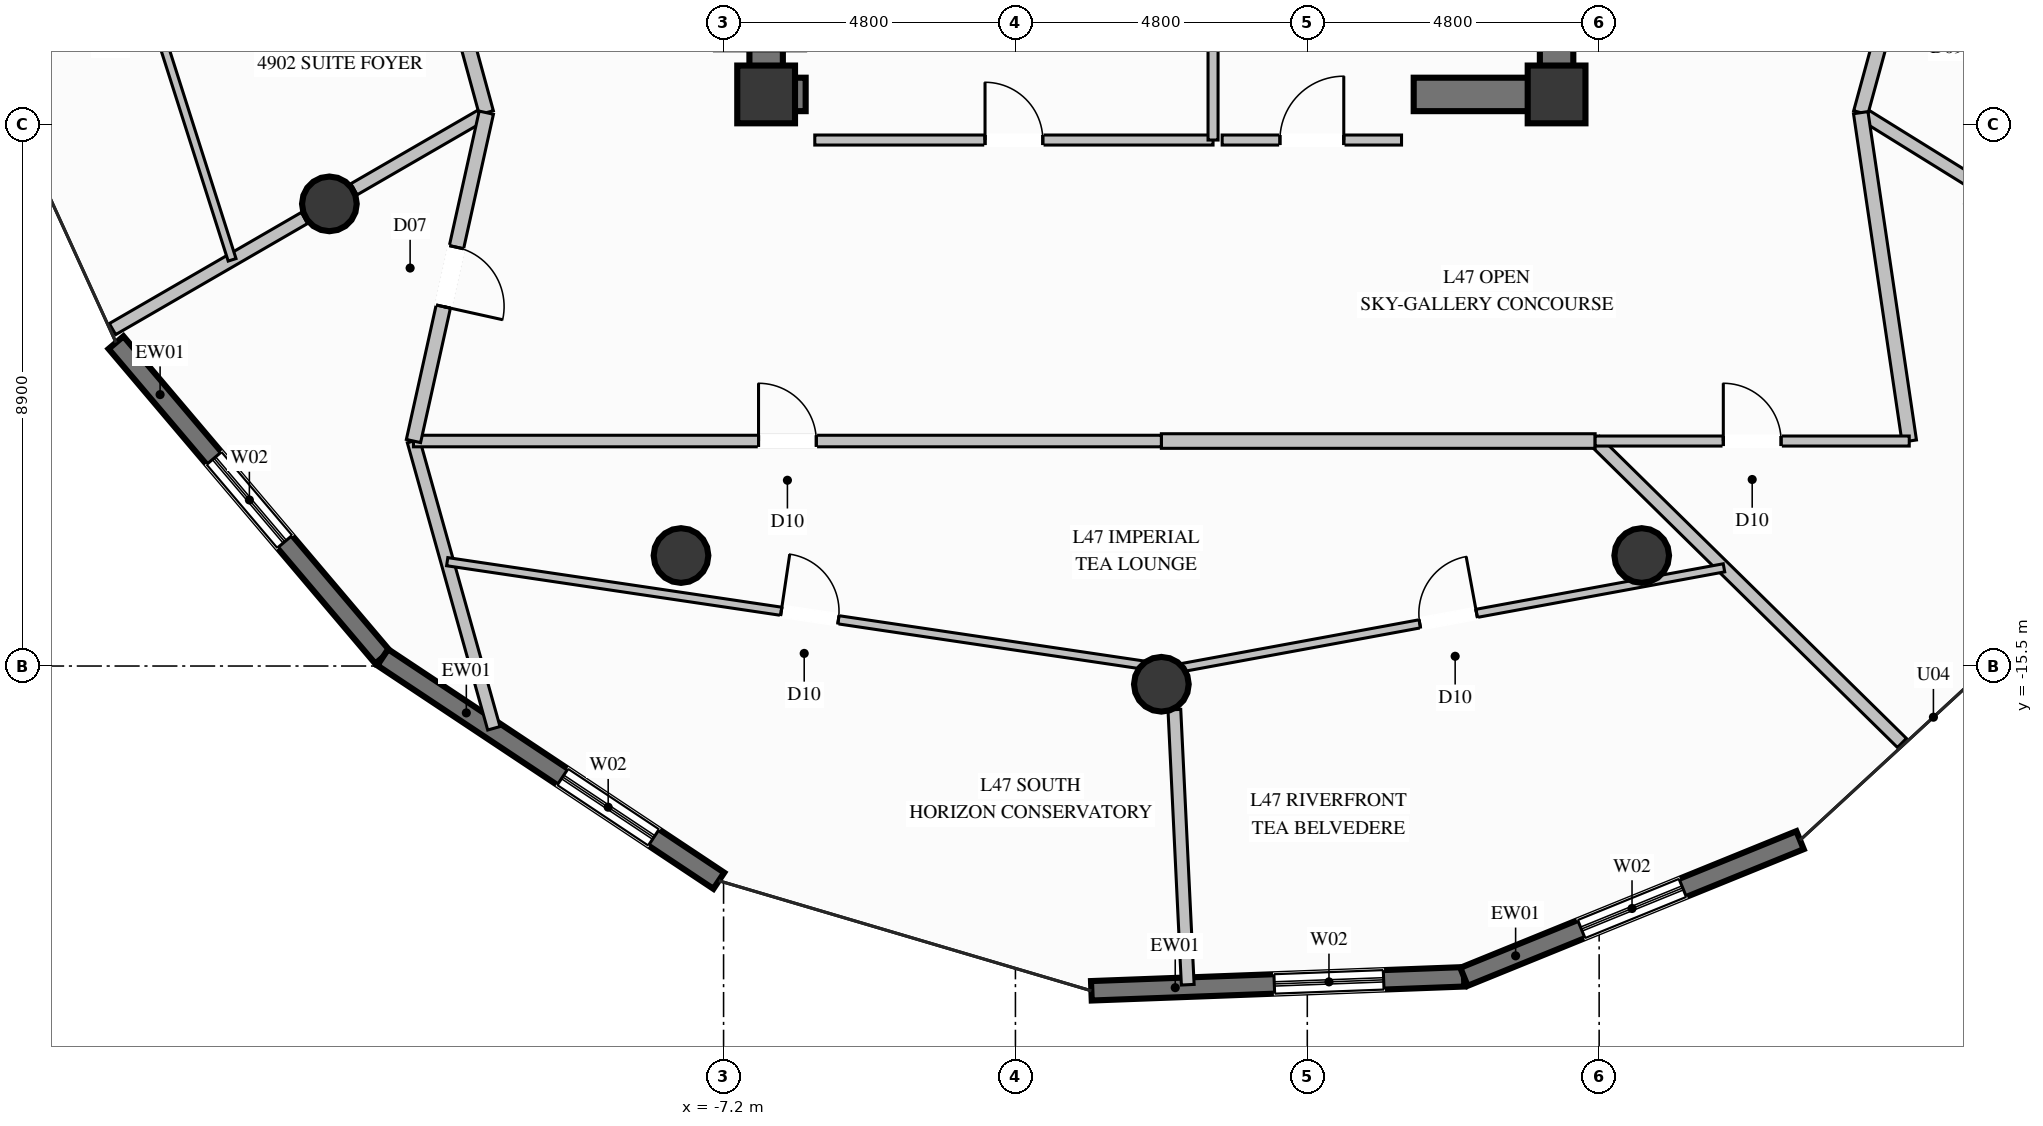
"""IFC4 building model, lengths in metres.
Left out: names, types, materials, properties, quantities, classifications, styles, units other than length and angle.
Written with IfcOpenShell. Run it as: python <this file> out.ifc"""

import sys

from ifc_helpers import new_model, si_unit, direction, frame, frame_2d, origin, origin_2d, place, context, subcontext, project, spatial, rectangle, circle, extrude, element, fill, save


model = new_model("IFC4")
c1 = context("Model", 3, precision=1e-05, world=origin(), true_north=direction((0.0, 1.0)))
c2 = subcontext(c1, "Body", "Model", "MODEL_VIEW")
j1 = project(units=[si_unit("LENGTHUNIT", "METRE"), si_unit("PLANEANGLEUNIT", "RADIAN")], contexts=[c1])
p1 = place(None, origin())
s1 = spatial("IfcSite", under=j1, at=p1, CompositionType="ELEMENT")
p2 = place(p1, origin())
s2 = spatial("IfcBuilding", under=s1, at=p2, CompositionType="ELEMENT")
p3 = place(p2, frame((0.0, 0.0, 184.0)))
s3 = spatial("IfcBuildingStorey", under=s2, at=p3, CompositionType="ELEMENT", Elevation=184.0)
for number, where, z_axis, x_axis in (
    (1, (-6.5, -6.1, 0.0), (0.0, 0.0, 1.0), (1.0, 0.0, 0.0)),
    (2, (6.5, -6.1, 0.0), (0.0, 0.0, 1.0), (1.0, 0.0, 0.0)),
):
    element("IfcColumn", number, at=place(p3, frame(where, z_axis=z_axis, x_axis=x_axis)), inside=s3, PredefinedType="COLUMN", context=c2, shape_type="SweptSolid", body=[
        extrude(rectangle(XDim=0.95, YDim=0.95, at=origin_2d()), origin(), (0.0, 0.0, 1.0), 3.6),
    ])
p4 = place(p3, frame((-6.225, -6.1, 0.0), z_axis=(0.0, 0.0, 1.0), x_axis=(1.0, 0.0, 0.0)))
e3 = element("IfcWall", 3, at=p4, inside=s3, PredefinedType="SHEAR", context=c2, shape_type="SweptSolid", body=[
    extrude(rectangle(XDim=0.375, YDim=0.55, at=frame_2d((0.188, 0.0))), origin(), (0.0, 0.0, 1.0), 3.6),
])
p5 = place(p3, frame((4.15, -6.1, 0.0), z_axis=(0.0, 0.0, 1.0), x_axis=(1.0, 0.0, 0.0)))
e4 = element("IfcWall", 4, at=p5, inside=s3, PredefinedType="SHEAR", context=c2, shape_type="SweptSolid", body=[
    extrude(rectangle(XDim=2.075, YDim=0.55, at=frame_2d((1.038, 0.0))), origin(), (0.0, 0.0, 1.0), 3.6),
])
p6 = place(p3, frame((-6.5, -6.375, 0.0), z_axis=(0.0, 0.0, 1.0), x_axis=(0.0, 1.0, 0.0)))
e5 = element("IfcWall", 5, at=p6, inside=s3, PredefinedType="SHEAR", context=c2, shape_type="SweptSolid", body=[
    extrude(rectangle(XDim=3.025, YDim=0.55, at=frame_2d((1.512, 0.0))), origin(), (0.0, 0.0, 1.0), 3.6),
])
p7 = place(p3, frame((6.5, -6.375, 0.0), z_axis=(0.0, 0.0, 1.0), x_axis=(0.0, 1.0, 0.0)))
e6 = element("IfcWall", 6, at=p7, inside=s3, PredefinedType="SHEAR", context=c2, shape_type="SweptSolid", body=[
    extrude(rectangle(XDim=4.025, YDim=0.55, at=frame_2d((2.012, 0.0))), origin(), (0.0, 0.0, 1.0), 3.6),
])
for number, where, z_axis, x_axis in (
    (7, (-13.683, -7.9, 0.0), (0.0, 0.0, 1.0), (1.0, 0.0, 0.0)),
    (8, (-7.9, -13.683, 0.0), (0.0, 0.0, 1.0), (1.0, 0.0, 0.0)),
    (9, (0.0, -15.8, 0.0), (0.0, 0.0, 1.0), (1.0, 0.0, 0.0)),
    (10, (7.9, -13.683, 0.0), (0.0, 0.0, 1.0), (1.0, 0.0, 0.0)),
):
    element("IfcColumn", number, at=place(p3, frame(where, z_axis=z_axis, x_axis=x_axis)), inside=s3, PredefinedType="COLUMN", context=c2, shape_type="SweptSolid", body=[
        extrude(circle(Radius=0.45, at=origin_2d()), origin(), (0.0, 0.0, 1.0), 3.6),
    ])
p8 = place(p3, frame((-12.806, -15.357, 0.0), z_axis=(0.0, 0.0, 1.0), x_axis=(-0.646480871515, 0.762930195212, 0.0)))
e11 = element("IfcWall", 11, at=p8, inside=s3, PredefinedType="SOLIDWALL", context=c2, shape_type="SweptSolid", body=[
    extrude(rectangle(XDim=6.784, YDim=0.32, at=frame_2d((3.392, 0.0))), origin(), (0.0, 0.0, 1.0), 3.36),
])
p9 = place(p8, frame((2.492, 0.0, 0.35)))
e12 = element("IfcOpeningElement", 12, at=p9, cuts=e11, PredefinedType="OPENING", context=c2, shape_type="SweptSolid", body=[
    extrude(rectangle(XDim=1.8, YDim=2.6, at=frame_2d((0.9, 1.3))), frame((0.0, 0.17, 0.0), z_axis=(0.0, -1.0, 0.0), x_axis=(1.0, 0.0, 0.0)), (0.0, 0.0, 1.0), 0.34),
])
p10 = place(p3, frame((-7.278, -19.031, 0.0), z_axis=(0.0, 0.0, 1.0), x_axis=(-0.832824739321, 0.553536768043, 0.0)))
e13 = element("IfcWall", 13, at=p10, inside=s3, PredefinedType="SOLIDWALL", context=c2, shape_type="SweptSolid", body=[
    extrude(rectangle(XDim=6.637, YDim=0.32, at=frame_2d((3.319, 0.0))), origin(), (0.0, 0.0, 1.0), 3.36),
])
p11 = place(p10, frame((1.285, 0.0, 0.35)))
e14 = element("IfcOpeningElement", 14, at=p11, cuts=e13, PredefinedType="OPENING", context=c2, shape_type="SweptSolid", body=[
    extrude(rectangle(XDim=1.8, YDim=2.6, at=frame_2d((0.9, 1.3))), frame((0.0, 0.17, 0.0), z_axis=(0.0, -1.0, 0.0), x_axis=(1.0, 0.0, 0.0)), (0.0, 0.0, 1.0), 0.34),
])
p12 = place(p3, frame((4.977, -20.611, 0.0), z_axis=(0.0, 0.0, 1.0), x_axis=(-0.999296497107, -0.037503478099, 0.0)))
e15 = element("IfcWall", 15, at=p12, inside=s3, PredefinedType="SOLIDWALL", context=c2, shape_type="SweptSolid", body=[
    extrude(rectangle(XDim=6.132, YDim=0.32, at=frame_2d((3.066, 0.0))), origin(), (0.0, 0.0, 1.0), 3.36),
])
p13 = place(p12, frame((1.322, 0.0, 0.35)))
e16 = element("IfcOpeningElement", 16, at=p13, cuts=e15, PredefinedType="OPENING", context=c2, shape_type="SweptSolid", body=[
    extrude(rectangle(XDim=1.8, YDim=2.6, at=frame_2d((0.9, 1.3))), frame((0.0, 0.17, 0.0), z_axis=(0.0, -1.0, 0.0), x_axis=(1.0, 0.0, 0.0)), (0.0, 0.0, 1.0), 0.34),
])
p14 = place(p3, frame((10.504, -18.364, 0.0), z_axis=(0.0, 0.0, 1.0), x_axis=(-0.926362198949, -0.376633875745, 0.0)))
e17 = element("IfcWall", 17, at=p14, inside=s3, PredefinedType="SOLIDWALL", context=c2, shape_type="SweptSolid", body=[
    extrude(rectangle(XDim=5.966, YDim=0.32, at=frame_2d((2.983, 0.0))), origin(), (0.0, 0.0, 1.0), 3.36),
])
p15 = place(p14, frame((2.083, 0.0, 0.35)))
e18 = element("IfcOpeningElement", 18, at=p15, cuts=e17, PredefinedType="OPENING", context=c2, shape_type="SweptSolid", body=[
    extrude(rectangle(XDim=1.8, YDim=2.6, at=frame_2d((0.9, 1.3))), frame((0.0, 0.17, 0.0), z_axis=(0.0, -1.0, 0.0), x_axis=(1.0, 0.0, 0.0)), (0.0, 0.0, 1.0), 0.34),
])
p16 = place(p3, frame((-5.7, -6.85, 0.0), z_axis=(0.0, 0.0, 1.0), x_axis=(1.0, 0.0, 0.0)))
e19 = element("IfcWall", 19, at=p16, inside=s3, PredefinedType="PARTITIONING", context=c2, shape_type="SweptSolid", body=[
    extrude(rectangle(XDim=6.55, YDim=0.165, at=frame_2d((3.275, 0.0))), origin(), (0.0, 0.0, 1.0), 2.445),
])
p17 = place(p16, frame((2.8, 0.0, 0.0)))
e20 = element("IfcOpeningElement", 20, at=p17, cuts=e19, PredefinedType="OPENING", context=c2, shape_type="SweptSolid", body=[
    extrude(rectangle(XDim=0.95, YDim=2.1, at=frame_2d((0.475, 1.05))), frame((0.0, 0.093, 0.0), z_axis=(0.0, -1.0, 0.0), x_axis=(1.0, 0.0, 0.0)), (0.0, 0.0, 1.0), 0.185),
])
p18 = place(p3, frame((0.85, -6.85, 0.0), z_axis=(0.0, 0.0, 1.0), x_axis=(0.0, 1.0, 0.0)))
e21 = element("IfcWall", 21, at=p18, inside=s3, PredefinedType="PARTITIONING", context=c2, shape_type="SweptSolid", body=[
    extrude(rectangle(XDim=3.35, YDim=0.165, at=frame_2d((1.675, 0.0))), origin(), (0.0, 0.0, 1.0), 3.36),
])
p19 = place(p3, frame((1.0, -6.85, 0.0), z_axis=(0.0, 0.0, 1.0), x_axis=(1.0, 0.0, 0.0)))
e22 = element("IfcWall", 22, at=p19, inside=s3, PredefinedType="PARTITIONING", context=c2, shape_type="SweptSolid", body=[
    extrude(rectangle(XDim=2.95, YDim=0.165, at=frame_2d((1.475, 0.0))), origin(), (0.0, 0.0, 1.0), 2.445),
])
p20 = place(p19, frame((0.95, 0.0, 0.0)))
e23 = element("IfcOpeningElement", 23, at=p20, cuts=e22, PredefinedType="OPENING", context=c2, shape_type="SweptSolid", body=[
    extrude(rectangle(XDim=1.05, YDim=2.15, at=frame_2d((0.525, 1.075))), frame((0.0, 0.093, 0.0), z_axis=(0.0, -1.0, 0.0), x_axis=(1.0, 0.0, 0.0)), (0.0, 0.0, 1.0), 0.185),
])
p21 = place(p3, frame((-11.102, -6.4, 0.0), z_axis=(0.0, 0.0, 1.0), x_axis=(-0.8654883009, -0.500929137708, 0.0)))
e24 = element("IfcWall", 24, at=p21, inside=s3, PredefinedType="PARTITIONING", context=c2, shape_type="SweptSolid", body=[
    extrude(rectangle(XDim=2.515, YDim=0.21, at=frame_2d((1.258, 0.0))), origin(), (0.0, 0.0, 1.0), 2.877),
])
p22 = place(p3, frame((-14.092, -8.131, 0.0), z_axis=(0.0, 0.0, 1.0), x_axis=(-0.865475144778, -0.50095186772, 0.0)))
e25 = element("IfcWall", 25, at=p22, inside=s3, PredefinedType="PARTITIONING", context=c2, shape_type="SweptSolid", body=[
    extrude(rectangle(XDim=3.649, YDim=0.21, at=frame_2d((1.824, 0.0))), origin(), (0.0, 0.0, 1.0), 3.36),
])
p23 = place(p3, frame((11.502, -6.4, 0.0), z_axis=(0.0, 0.0, 1.0), x_axis=(0.849789901528, -0.527121545054, 0.0)))
e26 = element("IfcWall", 26, at=p23, inside=s3, PredefinedType="PARTITIONING", context=c2, shape_type="SweptSolid", body=[
    extrude(rectangle(XDim=2.191, YDim=0.21, at=frame_2d((1.096, 0.0))), origin(), (0.0, 0.0, 1.0), 2.877),
])
p24 = place(p3, frame((-12.85, 0.0, 0.0), z_axis=(0.0, 0.0, 1.0), x_axis=(0.263484816116, -0.96466354325, 0.0)))
e27 = element("IfcWall", 27, at=p24, inside=s3, PredefinedType="PARTITIONING", context=c2, shape_type="SweptSolid", body=[
    extrude(rectangle(XDim=6.634, YDim=0.24, at=frame_2d((3.317, 0.0))), origin(), (0.0, 0.0, 1.0), 3.36),
])
p25 = place(p3, frame((-18.093, 0.0, 0.0), z_axis=(0.0, 0.0, 1.0), x_axis=(0.303563963888, -0.952811061979, 0.0)))
e28 = element("IfcWall", 28, at=p25, inside=s3, PredefinedType="PARTITIONING", context=c2, shape_type="SweptSolid", body=[
    extrude(rectangle(XDim=9.257, YDim=0.135, at=frame_2d((4.628, 0.0))), origin(), (0.0, 0.0, 1.0), 3.36),
])
p26 = place(p25, frame((4.153, 0.0, 0.0)))
e29 = element("IfcOpeningElement", 29, at=p26, cuts=e28, PredefinedType="OPENING", context=c2, shape_type="SweptSolid", body=[
    extrude(rectangle(XDim=0.95, YDim=2.1, at=frame_2d((0.475, 1.05))), frame((0.0, 0.078, 0.0), z_axis=(0.0, -1.0, 0.0), x_axis=(1.0, 0.0, 0.0)), (0.0, 0.0, 1.0), 0.155),
])
p27 = place(p3, frame((11.502, -6.4, 0.0), z_axis=(0.0, 0.0, 1.0), x_axis=(0.263465836707, 0.964668727019, 0.0)))
e30 = element("IfcWall", 30, at=p27, inside=s3, PredefinedType="PARTITIONING", context=c2, shape_type="SweptSolid", body=[
    extrude(rectangle(XDim=2.786, YDim=0.24, at=frame_2d((1.393, 0.0))), origin(), (0.0, 0.0, 1.0), 3.36),
])
p28 = place(p3, frame((7.134, -11.8, 0.0), z_axis=(0.0, 0.0, 1.0), x_axis=(0.712808698232, -0.701358510125, 0.0)))
e31 = element("IfcWall", 31, at=p28, inside=s3, PredefinedType="PARTITIONING", context=c2, shape_type="SweptSolid", body=[
    extrude(rectangle(XDim=7.079, YDim=0.21, at=frame_2d((3.54, 0.0))), origin(), (0.0, 0.0, 1.0), 3.36),
])
p29 = place(p3, frame((-12.3, -11.8, 0.0), z_axis=(0.0, 0.0, 1.0), x_axis=(0.269504390662, -0.962999160651, 0.0)))
e32 = element("IfcWall", 32, at=p29, inside=s3, PredefinedType="PARTITIONING", context=c2, shape_type="SweptSolid", body=[
    extrude(rectangle(XDim=4.905, YDim=0.21, at=frame_2d((2.453, 0.0))), origin(), (0.0, 0.0, 1.0), 3.36),
])
p30 = place(p3, frame((0.0, -11.8, 0.0), z_axis=(0.0, 0.0, 1.0), x_axis=(1.0, 0.0, 0.0)))
e33 = element("IfcWall", 33, at=p30, inside=s3, PredefinedType="PARTITIONING", context=c2, shape_type="SweptSolid", body=[
    extrude(rectangle(XDim=7.134, YDim=0.24, at=frame_2d((3.567, 0.0))), origin(), (0.0, 0.0, 1.0), 3.36),
])
p31 = place(p3, frame((-12.3, -11.8, 0.0), z_axis=(0.0, 0.0, 1.0), x_axis=(1.0, 0.0, 0.0)))
e34 = element("IfcWall", 34, at=p31, inside=s3, PredefinedType="PARTITIONING", context=c2, shape_type="SweptSolid", body=[
    extrude(rectangle(XDim=12.3, YDim=0.19, at=frame_2d((6.15, 0.0))), origin(), (0.0, 0.0, 1.0), 3.36),
])
p32 = place(p31, frame((5.675, 0.0, 0.0)))
e35 = element("IfcOpeningElement", 35, at=p32, cuts=e34, PredefinedType="OPENING", context=c2, shape_type="SweptSolid", body=[
    extrude(rectangle(XDim=0.95, YDim=2.1, at=frame_2d((0.475, 1.05))), frame((0.0, 0.105, 0.0), z_axis=(0.0, -1.0, 0.0), x_axis=(1.0, 0.0, 0.0)), (0.0, 0.0, 1.0), 0.21),
])
p33 = place(p3, frame((-11.102, -6.4, 0.0), z_axis=(0.0, 0.0, 1.0), x_axis=(-0.216579944639, -0.976264885971, 0.0)))
e36 = element("IfcWall", 36, at=p33, inside=s3, PredefinedType="PARTITIONING", context=c2, shape_type="SweptSolid", body=[
    extrude(rectangle(XDim=5.531, YDim=0.24, at=frame_2d((2.766, 0.0))), origin(), (0.0, 0.0, 1.0), 3.36),
])
p34 = place(p33, frame((2.266, 0.0, 0.0)))
e37 = element("IfcOpeningElement", 37, at=p34, cuts=e36, PredefinedType="OPENING", context=c2, shape_type="SweptSolid", body=[
    extrude(rectangle(XDim=1.0, YDim=2.2, at=frame_2d((0.5, 1.1))), frame((0.0, 0.13, 0.0), z_axis=(0.0, -1.0, 0.0), x_axis=(1.0, 0.0, 0.0)), (0.0, 0.0, 1.0), 0.26),
])
p35 = place(p3, frame((0.214, -16.218, 0.0), z_axis=(0.0, 0.0, 1.0), x_axis=(0.048576936136, -0.998819443781, 0.0)))
e38 = element("IfcWall", 38, at=p35, inside=s3, PredefinedType="PARTITIONING", context=c2, shape_type="SweptSolid", body=[
    extrude(rectangle(XDim=4.528, YDim=0.21, at=frame_2d((2.264, 0.0))), origin(), (0.0, 0.0, 1.0), 3.36),
])
p36 = place(p3, frame((-11.745, -13.784, 0.0), z_axis=(0.0, 0.0, 1.0), x_axis=(0.989154922739, -0.146875930026, 0.0)))
e39 = element("IfcWall", 39, at=p36, inside=s3, PredefinedType="PARTITIONING", context=c2, shape_type="SweptSolid", body=[
    extrude(rectangle(XDim=12.058, YDim=0.135, at=frame_2d((6.029, 0.0))), origin(), (0.0, 0.0, 1.0), 2.929),
])
p37 = place(p36, frame((5.554, 0.0, 0.0)))
e40 = element("IfcOpeningElement", 40, at=p37, cuts=e39, PredefinedType="OPENING", context=c2, shape_type="SweptSolid", body=[
    extrude(rectangle(XDim=0.95, YDim=2.1, at=frame_2d((0.475, 1.05))), frame((0.0, 0.078, 0.0), z_axis=(0.0, -1.0, 0.0), x_axis=(1.0, 0.0, 0.0)), (0.0, 0.0, 1.0), 0.155),
])
p38 = place(p3, frame((0.182, -15.555, 0.0), z_axis=(0.0, 0.0, 1.0), x_axis=(0.983473659369, 0.181051267126, 0.0)))
e41 = element("IfcWall", 41, at=p38, inside=s3, PredefinedType="PARTITIONING", context=c2, shape_type="SweptSolid", body=[
    extrude(rectangle(XDim=9.223, YDim=0.135, at=frame_2d((4.612, 0.0))), origin(), (0.0, 0.0, 1.0), 2.929),
])
p39 = place(p38, frame((4.137, 0.0, 0.0)))
e42 = element("IfcOpeningElement", 42, at=p39, cuts=e41, PredefinedType="OPENING", context=c2, shape_type="SweptSolid", body=[
    extrude(rectangle(XDim=0.95, YDim=2.1, at=frame_2d((0.475, 1.05))), frame((0.0, 0.078, 0.0), z_axis=(0.0, -1.0, 0.0), x_axis=(1.0, 0.0, 0.0)), (0.0, 0.0, 1.0), 0.155),
])
p40 = place(p3, frame((12.3, -11.8, 0.0), z_axis=(0.0, 0.0, 1.0), x_axis=(-0.146203405363, 0.98925454978, 0.0)))
e43 = element("IfcWall", 43, at=p40, inside=s3, PredefinedType="PARTITIONING", context=c2, shape_type="SweptSolid", body=[
    extrude(rectangle(XDim=5.459, YDim=0.24, at=frame_2d((2.729, 0.0))), origin(), (0.0, 0.0, 1.0), 3.36),
])
p41 = place(p3, frame((7.134, -11.8, 0.0), z_axis=(0.0, 0.0, 1.0), x_axis=(1.0, 0.0, 0.0)))
e44 = element("IfcWall", 44, at=p41, inside=s3, PredefinedType="PARTITIONING", context=c2, shape_type="SweptSolid", body=[
    extrude(rectangle(XDim=5.166, YDim=0.165, at=frame_2d((2.583, 0.0))), origin(), (0.0, 0.0, 1.0), 3.36),
])
p42 = place(p41, frame((2.108, 0.0, 0.0)))
e45 = element("IfcOpeningElement", 45, at=p42, cuts=e44, PredefinedType="OPENING", context=c2, shape_type="SweptSolid", body=[
    extrude(rectangle(XDim=0.95, YDim=2.1, at=frame_2d((0.475, 1.05))), frame((0.0, 0.093, 0.0), z_axis=(0.0, -1.0, 0.0), x_axis=(1.0, 0.0, 0.0)), (0.0, 0.0, 1.0), 0.185),
])
p43 = place(p9, origin())
e46 = element("IfcWindow", 46, at=p43, inside=s3, PartitioningType="SINGLE_PANEL", PredefinedType="WINDOW", context=c2, shape_type="SweptSolid", body=[
    extrude(rectangle(XDim=1.8, YDim=2.6, at=frame_2d((0.9, 1.3))), frame((0.0, 0.03, 0.0), z_axis=(0.0, -1.0, 0.0), x_axis=(1.0, 0.0, 0.0)), (0.0, 0.0, 1.0), 0.06),
])
fill(e12, e46)
p44 = place(p11, origin())
e47 = element("IfcWindow", 47, at=p44, inside=s3, PartitioningType="SINGLE_PANEL", PredefinedType="WINDOW", context=c2, shape_type="SweptSolid", body=[
    extrude(rectangle(XDim=1.8, YDim=2.6, at=frame_2d((0.9, 1.3))), frame((0.0, 0.03, 0.0), z_axis=(0.0, -1.0, 0.0), x_axis=(1.0, 0.0, 0.0)), (0.0, 0.0, 1.0), 0.06),
])
fill(e14, e47)
p45 = place(p13, origin())
e48 = element("IfcWindow", 48, at=p45, inside=s3, PartitioningType="SINGLE_PANEL", PredefinedType="WINDOW", context=c2, shape_type="SweptSolid", body=[
    extrude(rectangle(XDim=1.8, YDim=2.6, at=frame_2d((0.9, 1.3))), frame((0.0, 0.03, 0.0), z_axis=(0.0, -1.0, 0.0), x_axis=(1.0, 0.0, 0.0)), (0.0, 0.0, 1.0), 0.06),
])
fill(e16, e48)
p46 = place(p15, origin())
e49 = element("IfcWindow", 49, at=p46, inside=s3, PartitioningType="SINGLE_PANEL", PredefinedType="WINDOW", context=c2, shape_type="SweptSolid", body=[
    extrude(rectangle(XDim=1.8, YDim=2.6, at=frame_2d((0.9, 1.3))), frame((0.0, 0.03, 0.0), z_axis=(0.0, -1.0, 0.0), x_axis=(1.0, 0.0, 0.0)), (0.0, 0.0, 1.0), 0.06),
])
fill(e18, e49)
p47 = place(p17, origin())
e50 = element("IfcDoor", 50, at=p47, inside=s3, OperationType="SINGLE_SWING_LEFT", PredefinedType="DOOR", context=c2, shape_type="SweptSolid", body=[
    extrude(rectangle(XDim=0.95, YDim=2.1, at=frame_2d((0.475, 1.05))), frame((0.0, 0.025, 0.0), z_axis=(0.0, -1.0, 0.0), x_axis=(1.0, 0.0, 0.0)), (0.0, 0.0, 1.0), 0.05),
])
fill(e20, e50)
p48 = place(p20, origin())
e51 = element("IfcDoor", 51, at=p48, inside=s3, OperationType="SINGLE_SWING_RIGHT", PredefinedType="DOOR", context=c2, shape_type="SweptSolid", body=[
    extrude(rectangle(XDim=1.05, YDim=2.15, at=frame_2d((0.525, 1.075))), frame((0.0, 0.025, 0.0), z_axis=(0.0, -1.0, 0.0), x_axis=(1.0, 0.0, 0.0)), (0.0, 0.0, 1.0), 0.05),
])
fill(e23, e51)
p49 = place(p32, origin())
e52 = element("IfcDoor", 52, at=p49, inside=s3, OperationType="SINGLE_SWING_LEFT", PredefinedType="DOOR", context=c2, shape_type="SweptSolid", body=[
    extrude(rectangle(XDim=0.95, YDim=2.1, at=frame_2d((0.475, 1.05))), frame((0.0, 0.025, 0.0), z_axis=(0.0, -1.0, 0.0), x_axis=(1.0, 0.0, 0.0)), (0.0, 0.0, 1.0), 0.05),
])
fill(e35, e52)
p50 = place(p34, origin())
e53 = element("IfcDoor", 53, at=p50, inside=s3, OperationType="SINGLE_SWING_RIGHT", PredefinedType="DOOR", context=c2, shape_type="SweptSolid", body=[
    extrude(rectangle(XDim=1.0, YDim=2.2, at=frame_2d((0.5, 1.1))), frame((0.0, 0.025, 0.0), z_axis=(0.0, -1.0, 0.0), x_axis=(1.0, 0.0, 0.0)), (0.0, 0.0, 1.0), 0.05),
])
fill(e37, e53)
p51 = place(p37, origin())
e54 = element("IfcDoor", 54, at=p51, inside=s3, OperationType="SINGLE_SWING_LEFT", PredefinedType="DOOR", context=c2, shape_type="SweptSolid", body=[
    extrude(rectangle(XDim=0.95, YDim=2.1, at=frame_2d((0.475, 1.05))), frame((0.0, 0.025, 0.0), z_axis=(0.0, -1.0, 0.0), x_axis=(1.0, 0.0, 0.0)), (0.0, 0.0, 1.0), 0.05),
])
fill(e40, e54)
p52 = place(p39, origin())
e55 = element("IfcDoor", 55, at=p52, inside=s3, OperationType="SINGLE_SWING_RIGHT", PredefinedType="DOOR", context=c2, shape_type="SweptSolid", body=[
    extrude(rectangle(XDim=0.95, YDim=2.1, at=frame_2d((0.475, 1.05))), frame((0.0, 0.025, 0.0), z_axis=(0.0, -1.0, 0.0), x_axis=(1.0, 0.0, 0.0)), (0.0, 0.0, 1.0), 0.05),
])
fill(e42, e55)
p53 = place(p42, origin())
e56 = element("IfcDoor", 56, at=p53, inside=s3, OperationType="SINGLE_SWING_LEFT", PredefinedType="DOOR", context=c2, shape_type="SweptSolid", body=[
    extrude(rectangle(XDim=0.95, YDim=2.1, at=frame_2d((0.475, 1.05))), frame((0.0, 0.025, 0.0), z_axis=(0.0, -1.0, 0.0), x_axis=(1.0, 0.0, 0.0)), (0.0, 0.0, 1.0), 0.05),
])
fill(e45, e56)
save(model, sys.argv[1])
